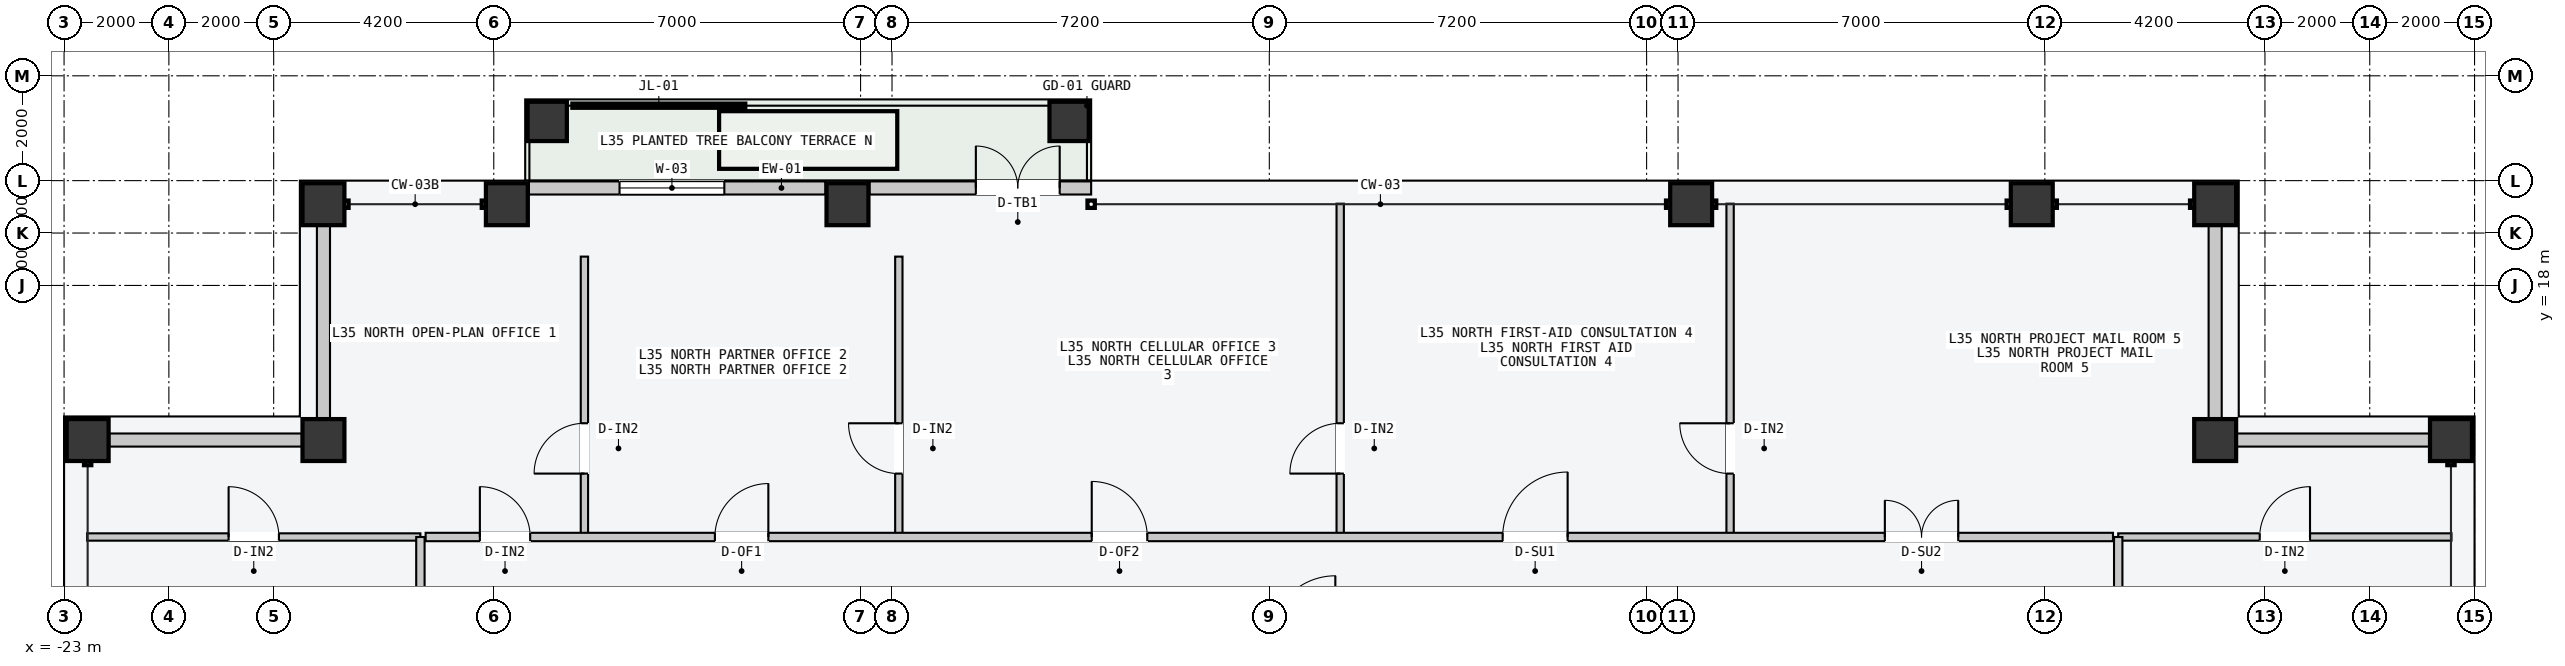
"""IFC4 building model, lengths in metres.
Left out: names, types, materials, properties, quantities, classifications, styles, units other than length and angle.
Written with IfcOpenShell. Run it as: python <this file> out.ifc"""

import sys

from ifc_helpers import new_model, si_unit, direction, frame, frame_2d, origin, origin_2d, place, context, subcontext, project, spatial, rectangle, hollow_rectangle, extrude, element, fill, save


model = new_model("IFC4")
c1 = context("Model", 3, precision=1e-05, world=origin(), true_north=direction((0.0, 1.0)))
c2 = subcontext(c1, "Body", "Model", "MODEL_VIEW")
j1 = project(units=[si_unit("LENGTHUNIT", "METRE"), si_unit("PLANEANGLEUNIT", "RADIAN")], contexts=[c1])
p1 = place(None, origin())
s1 = spatial("IfcSite", under=j1, at=p1, CompositionType="ELEMENT")
p2 = place(p1, origin())
s2 = spatial("IfcBuilding", under=s1, at=p2, CompositionType="ELEMENT")
p3 = place(p2, frame((0.0, 0.0, 135.0)))
s3 = spatial("IfcBuildingStorey", under=s2, at=p3, CompositionType="ELEMENT", Elevation=135.0)
for number, where, z_axis, x_axis in (
    (1, (-18.05, 19.55, 0.0), (0.0, 0.0, 1.0), (1.0, 0.0, 0.0)),
    (2, (-14.55, 19.55, 0.0), (0.0, 0.0, 1.0), (1.0, 0.0, 0.0)),
    (3, (-8.05, 19.55, 0.0), (0.0, 0.0, 1.0), (1.0, 0.0, 0.0)),
    (4, (8.05, 19.55, 0.0), (0.0, 0.0, 1.0), (1.0, 0.0, 0.0)),
    (5, (14.55, 19.55, 0.0), (0.0, 0.0, 1.0), (1.0, 0.0, 0.0)),
    (6, (18.05, 19.55, 0.0), (0.0, 0.0, 1.0), (1.0, 0.0, 0.0)),
    (7, (-22.55, 15.05, 0.0), (0.0, 0.0, 1.0), (0.0, 1.0, 0.0)),
    (8, (22.55, 15.05, 0.0), (0.0, 0.0, 1.0), (0.0, 1.0, 0.0)),
    (9, (-18.05, 15.05, 0.0), (0.0, 0.0, 1.0), (1.0, 0.0, 0.0)),
    (10, (18.05, 15.05, 0.0), (0.0, 0.0, 1.0), (1.0, 0.0, 0.0)),
):
    element("IfcColumn", number, at=place(p3, frame(where, z_axis=z_axis, x_axis=x_axis)), inside=s3, PredefinedType="COLUMN", context=c2, shape_type="SweptSolid", body=[
        extrude(hollow_rectangle(XDim=0.8, YDim=0.8, WallThickness=0.036, at=origin_2d()), origin(), (0.0, 0.0, 1.0), 3.6),
    ])
for number, where, z_axis, x_axis in (
    (11, (-13.78, 21.13, 0.0), (0.0, 0.0, 1.0), (1.0, 0.0, 0.0)),
    (12, (-3.82, 21.13, 0.0), (0.0, 0.0, 1.0), (1.0, 0.0, 0.0)),
):
    element("IfcColumn", number, at=place(p3, frame(where, z_axis=z_axis, x_axis=x_axis)), inside=s3, PredefinedType="COLUMN", context=c2, shape_type="SweptSolid", body=[
        extrude(hollow_rectangle(XDim=0.75, YDim=0.75, WallThickness=0.032, at=origin_2d()), origin(), (0.0, 0.0, 1.0), 3.6),
    ])
p4 = place(p3, frame((-14.13, 19.86, 0.0), z_axis=(0.0, 0.0, 1.0), x_axis=(1.0, 0.0, 0.0)))
e13 = element("IfcWall", 13, at=p4, inside=s3, PredefinedType="STANDARD", context=c2, shape_type="SweptSolid", body=[
    extrude(rectangle(XDim=5.66, YDim=0.25, at=frame_2d((2.83, 0.0))), origin(), (0.0, 0.0, 1.0), 3.4),
])
p5 = place(p4, frame((1.73, 0.0, 0.85)))
e14 = element("IfcOpeningElement", 14, at=p5, cuts=e13, PredefinedType="OPENING", context=c2, shape_type="SweptSolid", body=[
    extrude(rectangle(XDim=2.0, YDim=2.1, at=frame_2d((1.0, 1.05))), frame((0.0, 0.135, 0.0), z_axis=(0.0, -1.0, 0.0), x_axis=(1.0, 0.0, 0.0)), (0.0, 0.0, 1.0), 0.27),
])
p6 = place(p3, frame((-7.63, 19.86, 0.0), z_axis=(0.0, 0.0, 1.0), x_axis=(1.0, 0.0, 0.0)))
e15 = element("IfcWall", 15, at=p6, inside=s3, PredefinedType="STANDARD", context=c2, shape_type="SweptSolid", body=[
    extrude(rectangle(XDim=4.23, YDim=0.25, at=frame_2d((2.115, 0.0))), origin(), (0.0, 0.0, 1.0), 3.4),
])
p7 = place(p6, frame((2.03, 0.0, 0.0)))
e16 = element("IfcOpeningElement", 16, at=p7, cuts=e15, PredefinedType="OPENING", context=c2, shape_type="SweptSolid", body=[
    extrude(rectangle(XDim=1.6, YDim=2.2, at=frame_2d((0.8, 1.1))), frame((0.0, 0.135, 0.0), z_axis=(0.0, -1.0, 0.0), x_axis=(1.0, 0.0, 0.0)), (0.0, 0.0, 1.0), 0.27),
])
for number, where, z_axis, x_axis in (
    (17, (-22.14, 15.05, 0.0), (0.0, 0.0, 1.0), (1.0, 0.0, 0.0)),
    (18, (-18.05, 15.46, 0.0), (0.0, 0.0, 1.0), (0.0, 1.0, 0.0)),
    (19, (18.46, 15.05, 0.0), (0.0, 0.0, 1.0), (1.0, 0.0, 0.0)),
    (20, (18.05, 15.46, 0.0), (0.0, 0.0, 1.0), (0.0, 1.0, 0.0)),
):
    element("IfcWall", number, at=place(p3, frame(where, z_axis=z_axis, x_axis=x_axis)), inside=s3, PredefinedType="STANDARD", context=c2, shape_type="SweptSolid", body=[
        extrude(rectangle(XDim=3.68, YDim=0.25, at=frame_2d((1.84, 0.0))), origin(), (0.0, 0.0, 1.0), 2.75),
    ])
p8 = place(p3, frame((-13.07, 13.26, 0.0), z_axis=(0.0, 0.0, 1.0), x_axis=(0.0, 1.0, 0.0)))
e21 = element("IfcWall", 21, at=p8, inside=s3, PredefinedType="PARTITIONING", context=c2, shape_type="SweptSolid", body=[
    extrude(rectangle(XDim=5.29, YDim=0.14, at=frame_2d((2.645, 0.0))), origin(), (0.0, 0.0, 1.0), 3.4),
])
p9 = place(p8, frame((1.15, 0.0, 0.0)))
e22 = element("IfcOpeningElement", 22, at=p9, cuts=e21, PredefinedType="OPENING", context=c2, shape_type="SweptSolid", body=[
    extrude(rectangle(XDim=0.96, YDim=2.18, at=frame_2d((0.48, 1.09))), frame((0.0, 0.08, 0.0), z_axis=(0.0, -1.0, 0.0), x_axis=(1.0, 0.0, 0.0)), (0.0, 0.0, 1.0), 0.16),
])
p10 = place(p3, frame((-7.07, 13.26, 0.0), z_axis=(0.0, 0.0, 1.0), x_axis=(0.0, 1.0, 0.0)))
e23 = element("IfcWall", 23, at=p10, inside=s3, PredefinedType="PARTITIONING", context=c2, shape_type="SweptSolid", body=[
    extrude(rectangle(XDim=5.29, YDim=0.14, at=frame_2d((2.645, 0.0))), origin(), (0.0, 0.0, 1.0), 3.4),
])
p11 = place(p10, frame((1.15, 0.0, 0.0)))
e24 = element("IfcOpeningElement", 24, at=p11, cuts=e23, PredefinedType="OPENING", context=c2, shape_type="SweptSolid", body=[
    extrude(rectangle(XDim=0.96, YDim=2.18, at=frame_2d((0.48, 1.09))), frame((0.0, 0.08, 0.0), z_axis=(0.0, -1.0, 0.0), x_axis=(1.0, 0.0, 0.0)), (0.0, 0.0, 1.0), 0.16),
])
p12 = place(p3, frame((1.353, 13.26, 0.0), z_axis=(0.0, 0.0, 1.0), x_axis=(0.0, 1.0, 0.0)))
e25 = element("IfcWall", 25, at=p12, inside=s3, PredefinedType="PARTITIONING", context=c2, shape_type="SweptSolid", body=[
    extrude(rectangle(XDim=6.3, YDim=0.14, at=frame_2d((3.15, 0.0))), origin(), (0.0, 0.0, 1.0), 3.4),
])
p13 = place(p12, frame((1.15, 0.0, 0.0)))
e26 = element("IfcOpeningElement", 26, at=p13, cuts=e25, PredefinedType="OPENING", context=c2, shape_type="SweptSolid", body=[
    extrude(rectangle(XDim=0.96, YDim=2.18, at=frame_2d((0.48, 1.09))), frame((0.0, 0.08, 0.0), z_axis=(0.0, -1.0, 0.0), x_axis=(1.0, 0.0, 0.0)), (0.0, 0.0, 1.0), 0.16),
])
p14 = place(p3, frame((8.793, 13.26, 0.0), z_axis=(0.0, 0.0, 1.0), x_axis=(0.0, 1.0, 0.0)))
e27 = element("IfcWall", 27, at=p14, inside=s3, PredefinedType="PARTITIONING", context=c2, shape_type="SweptSolid", body=[
    extrude(rectangle(XDim=6.3, YDim=0.14, at=frame_2d((3.15, 0.0))), origin(), (0.0, 0.0, 1.0), 3.4),
])
p15 = place(p14, frame((1.15, 0.0, 0.0)))
e28 = element("IfcOpeningElement", 28, at=p15, cuts=e27, PredefinedType="OPENING", context=c2, shape_type="SweptSolid", body=[
    extrude(rectangle(XDim=0.96, YDim=2.18, at=frame_2d((0.48, 1.09))), frame((0.0, 0.08, 0.0), z_axis=(0.0, -1.0, 0.0), x_axis=(1.0, 0.0, 0.0)), (0.0, 0.0, 1.0), 0.16),
])
p16 = place(p3, frame((-16.1, 13.2, 0.0), z_axis=(0.0, 0.0, 1.0), x_axis=(1.0, 0.0, 0.0)))
e29 = element("IfcWall", 29, at=p16, inside=s3, PredefinedType="PARTITIONING", context=c2, shape_type="SweptSolid", body=[
    extrude(rectangle(XDim=32.2, YDim=0.16, at=frame_2d((16.1, 0.0))), origin(), (0.0, 0.0, 1.0), 3.4),
])
p17 = place(p16, frame((1.035, 0.0, 0.0)))
e30 = element("IfcOpeningElement", 30, at=p17, cuts=e29, PredefinedType="OPENING", context=c2, shape_type="SweptSolid", body=[
    extrude(rectangle(XDim=0.96, YDim=2.18, at=frame_2d((0.48, 1.09))), frame((0.0, 0.09, 0.0), z_axis=(0.0, -1.0, 0.0), x_axis=(1.0, 0.0, 0.0)), (0.0, 0.0, 1.0), 0.18),
])
p18 = place(p16, frame((5.52, 0.0, 0.0)))
e31 = element("IfcOpeningElement", 31, at=p18, cuts=e29, PredefinedType="OPENING", context=c2, shape_type="SweptSolid", body=[
    extrude(rectangle(XDim=1.02, YDim=2.2, at=frame_2d((0.51, 1.1))), frame((0.0, 0.09, 0.0), z_axis=(0.0, -1.0, 0.0), x_axis=(1.0, 0.0, 0.0)), (0.0, 0.0, 1.0), 0.18),
])
p19 = place(p16, frame((12.711, 0.0, 0.0)))
e32 = element("IfcOpeningElement", 32, at=p19, cuts=e29, PredefinedType="OPENING", context=c2, shape_type="SweptSolid", body=[
    extrude(rectangle(XDim=1.06, YDim=2.2, at=frame_2d((0.53, 1.1))), frame((0.0, 0.09, 0.0), z_axis=(0.0, -1.0, 0.0), x_axis=(1.0, 0.0, 0.0)), (0.0, 0.0, 1.0), 0.18),
])
p20 = place(p16, frame((20.553, 0.0, 0.0)))
e33 = element("IfcOpeningElement", 33, at=p20, cuts=e29, PredefinedType="OPENING", context=c2, shape_type="SweptSolid", body=[
    extrude(rectangle(XDim=1.24, YDim=2.24, at=frame_2d((0.62, 1.12))), frame((0.0, 0.09, 0.0), z_axis=(0.0, -1.0, 0.0), x_axis=(1.0, 0.0, 0.0)), (0.0, 0.0, 1.0), 0.18),
])
p21 = place(p16, frame((27.847, 0.0, 0.0)))
e34 = element("IfcOpeningElement", 34, at=p21, cuts=e29, PredefinedType="OPENING", context=c2, shape_type="SweptSolid", body=[
    extrude(rectangle(XDim=1.4, YDim=2.2, at=frame_2d((0.7, 1.1))), frame((0.0, 0.09, 0.0), z_axis=(0.0, -1.0, 0.0), x_axis=(1.0, 0.0, 0.0)), (0.0, 0.0, 1.0), 0.18),
])
p22 = place(p3, frame((-22.56, 13.2, 0.0), z_axis=(0.0, 0.0, 1.0), x_axis=(1.0, 0.0, 0.0)))
e35 = element("IfcWall", 35, at=p22, inside=s3, PredefinedType="PARTITIONING", context=c2, shape_type="SweptSolid", body=[
    extrude(rectangle(XDim=6.36, YDim=0.14, at=frame_2d((3.18, 0.0))), origin(), (0.0, 0.0, 1.0), 3.4),
])
p23 = place(p22, frame((2.7, 0.0, 0.0)))
e36 = element("IfcOpeningElement", 36, at=p23, cuts=e35, PredefinedType="OPENING", context=c2, shape_type="SweptSolid", body=[
    extrude(rectangle(XDim=0.96, YDim=2.18, at=frame_2d((0.48, 1.09))), frame((0.0, 0.08, 0.0), z_axis=(0.0, -1.0, 0.0), x_axis=(1.0, 0.0, 0.0)), (0.0, 0.0, 1.0), 0.16),
])
p24 = place(p3, frame((16.2, 13.2, 0.0), z_axis=(0.0, 0.0, 1.0), x_axis=(1.0, 0.0, 0.0)))
e37 = element("IfcWall", 37, at=p24, inside=s3, PredefinedType="PARTITIONING", context=c2, shape_type="SweptSolid", body=[
    extrude(rectangle(XDim=6.36, YDim=0.14, at=frame_2d((3.18, 0.0))), origin(), (0.0, 0.0, 1.0), 3.4),
])
p25 = place(p24, frame((2.7, 0.0, 0.0)))
e38 = element("IfcOpeningElement", 38, at=p25, cuts=e37, PredefinedType="OPENING", context=c2, shape_type="SweptSolid", body=[
    extrude(rectangle(XDim=0.96, YDim=2.18, at=frame_2d((0.48, 1.09))), frame((0.0, 0.08, 0.0), z_axis=(0.0, -1.0, 0.0), x_axis=(1.0, 0.0, 0.0)), (0.0, 0.0, 1.0), 0.16),
])
for number, where, z_axis, x_axis in (
    (39, (-16.2, 11.25, 0.0), (0.0, 0.0, 1.0), (0.0, 1.0, 0.0)),
    (40, (16.2, 11.25, 0.0), (0.0, 0.0, 1.0), (0.0, 1.0, 0.0)),
):
    element("IfcWall", number, at=place(p3, frame(where, z_axis=z_axis, x_axis=x_axis)), inside=s3, PredefinedType="PARTITIONING", context=c2, shape_type="SweptSolid", body=[
        extrude(rectangle(XDim=1.95, YDim=0.16, at=frame_2d((0.975, 0.0))), origin(), (0.0, 0.0, 1.0), 3.4),
    ])
p26 = place(p5, origin())
e41 = element("IfcWindow", 41, at=p26, inside=s3, PartitioningType="SINGLE_PANEL", PredefinedType="WINDOW", context=c2, shape_type="SweptSolid", body=[
    extrude(rectangle(XDim=2.0, YDim=2.1, at=frame_2d((1.0, 1.05))), frame((0.0, 0.03, 0.0), z_axis=(0.0, -1.0, 0.0), x_axis=(1.0, 0.0, 0.0)), (0.0, 0.0, 1.0), 0.06),
])
fill(e14, e41)
p27 = place(p7, origin())
e42 = element("IfcDoor", 42, at=p27, inside=s3, OperationType="DOUBLE_DOOR_SINGLE_SWING", PredefinedType="DOOR", context=c2, shape_type="SweptSolid", body=[
    extrude(rectangle(XDim=1.6, YDim=2.2, at=frame_2d((0.8, 1.1))), frame((0.0, 0.025, 0.0), z_axis=(0.0, -1.0, 0.0), x_axis=(1.0, 0.0, 0.0)), (0.0, 0.0, 1.0), 0.05),
])
fill(e16, e42)
p28 = place(p9, origin())
e43 = element("IfcDoor", 43, at=p28, inside=s3, OperationType="SINGLE_SWING_LEFT", PredefinedType="DOOR", context=c2, shape_type="SweptSolid", body=[
    extrude(rectangle(XDim=0.96, YDim=2.18, at=frame_2d((0.48, 1.09))), frame((0.0, 0.025, 0.0), z_axis=(0.0, -1.0, 0.0), x_axis=(1.0, 0.0, 0.0)), (0.0, 0.0, 1.0), 0.05),
])
fill(e22, e43)
p29 = place(p11, origin())
e44 = element("IfcDoor", 44, at=p29, inside=s3, OperationType="SINGLE_SWING_RIGHT", PredefinedType="DOOR", context=c2, shape_type="SweptSolid", body=[
    extrude(rectangle(XDim=0.96, YDim=2.18, at=frame_2d((0.48, 1.09))), frame((0.0, 0.025, 0.0), z_axis=(0.0, -1.0, 0.0), x_axis=(1.0, 0.0, 0.0)), (0.0, 0.0, 1.0), 0.05),
])
fill(e24, e44)
p30 = place(p13, origin())
e45 = element("IfcDoor", 45, at=p30, inside=s3, OperationType="SINGLE_SWING_LEFT", PredefinedType="DOOR", context=c2, shape_type="SweptSolid", body=[
    extrude(rectangle(XDim=0.96, YDim=2.18, at=frame_2d((0.48, 1.09))), frame((0.0, 0.025, 0.0), z_axis=(0.0, -1.0, 0.0), x_axis=(1.0, 0.0, 0.0)), (0.0, 0.0, 1.0), 0.05),
])
fill(e26, e45)
p31 = place(p15, origin())
e46 = element("IfcDoor", 46, at=p31, inside=s3, OperationType="SINGLE_SWING_RIGHT", PredefinedType="DOOR", context=c2, shape_type="SweptSolid", body=[
    extrude(rectangle(XDim=0.96, YDim=2.18, at=frame_2d((0.48, 1.09))), frame((0.0, 0.025, 0.0), z_axis=(0.0, -1.0, 0.0), x_axis=(1.0, 0.0, 0.0)), (0.0, 0.0, 1.0), 0.05),
])
fill(e28, e46)
p32 = place(p17, origin())
e47 = element("IfcDoor", 47, at=p32, inside=s3, OperationType="SINGLE_SWING_LEFT", PredefinedType="DOOR", context=c2, shape_type="SweptSolid", body=[
    extrude(rectangle(XDim=0.96, YDim=2.18, at=frame_2d((0.48, 1.09))), frame((0.0, 0.025, 0.0), z_axis=(0.0, -1.0, 0.0), x_axis=(1.0, 0.0, 0.0)), (0.0, 0.0, 1.0), 0.05),
])
fill(e30, e47)
p33 = place(p18, origin())
e48 = element("IfcDoor", 48, at=p33, inside=s3, OperationType="SINGLE_SWING_RIGHT", PredefinedType="DOOR", context=c2, shape_type="SweptSolid", body=[
    extrude(rectangle(XDim=1.02, YDim=2.2, at=frame_2d((0.51, 1.1))), frame((0.0, 0.025, 0.0), z_axis=(0.0, -1.0, 0.0), x_axis=(1.0, 0.0, 0.0)), (0.0, 0.0, 1.0), 0.05),
])
fill(e31, e48)
p34 = place(p19, origin())
e49 = element("IfcDoor", 49, at=p34, inside=s3, OperationType="SINGLE_SWING_LEFT", PredefinedType="DOOR", context=c2, shape_type="SweptSolid", body=[
    extrude(rectangle(XDim=1.06, YDim=2.2, at=frame_2d((0.53, 1.1))), frame((0.0, 0.025, 0.0), z_axis=(0.0, -1.0, 0.0), x_axis=(1.0, 0.0, 0.0)), (0.0, 0.0, 1.0), 0.05),
])
fill(e32, e49)
p35 = place(p20, origin())
e50 = element("IfcDoor", 50, at=p35, inside=s3, OperationType="SINGLE_SWING_RIGHT", PredefinedType="DOOR", context=c2, shape_type="SweptSolid", body=[
    extrude(rectangle(XDim=1.24, YDim=2.24, at=frame_2d((0.62, 1.12))), frame((0.0, 0.025, 0.0), z_axis=(0.0, -1.0, 0.0), x_axis=(1.0, 0.0, 0.0)), (0.0, 0.0, 1.0), 0.05),
])
fill(e33, e50)
p36 = place(p21, origin())
e51 = element("IfcDoor", 51, at=p36, inside=s3, OperationType="DOUBLE_DOOR_SINGLE_SWING", PredefinedType="DOOR", context=c2, shape_type="SweptSolid", body=[
    extrude(rectangle(XDim=1.4, YDim=2.2, at=frame_2d((0.7, 1.1))), frame((0.0, 0.025, 0.0), z_axis=(0.0, -1.0, 0.0), x_axis=(1.0, 0.0, 0.0)), (0.0, 0.0, 1.0), 0.05),
])
fill(e34, e51)
p37 = place(p23, origin())
e52 = element("IfcDoor", 52, at=p37, inside=s3, OperationType="SINGLE_SWING_LEFT", PredefinedType="DOOR", context=c2, shape_type="SweptSolid", body=[
    extrude(rectangle(XDim=0.96, YDim=2.18, at=frame_2d((0.48, 1.09))), frame((0.0, 0.025, 0.0), z_axis=(0.0, -1.0, 0.0), x_axis=(1.0, 0.0, 0.0)), (0.0, 0.0, 1.0), 0.05),
])
fill(e36, e52)
p38 = place(p25, origin())
e53 = element("IfcDoor", 53, at=p38, inside=s3, OperationType="SINGLE_SWING_RIGHT", PredefinedType="DOOR", context=c2, shape_type="SweptSolid", body=[
    extrude(rectangle(XDim=0.96, YDim=2.18, at=frame_2d((0.48, 1.09))), frame((0.0, 0.025, 0.0), z_axis=(0.0, -1.0, 0.0), x_axis=(1.0, 0.0, 0.0)), (0.0, 0.0, 1.0), 0.05),
])
fill(e38, e53)
save(model, sys.argv[1])
